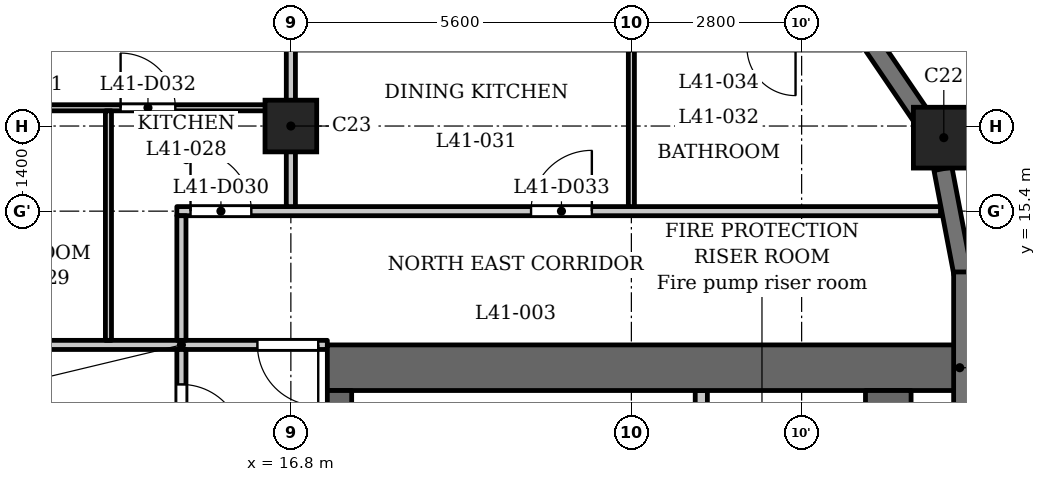
"""IFC4 building model, lengths in metres.
Left out: names, types, materials, properties, quantities, classifications, styles, units other than length and angle.
Written with IfcOpenShell. Run it as: python <this file> out.ifc"""

import sys

from ifc_helpers import new_model, si_unit, direction, frame, frame_2d, origin, origin_2d, place, context, subcontext, project, spatial, rectangle, extrude, element, fill, save


model = new_model("IFC4")
c1 = context("Model", 3, precision=1e-05, world=origin(), true_north=direction((0.0, 1.0)))
c2 = subcontext(c1, "Body", "Model", "MODEL_VIEW")
j1 = project(units=[si_unit("LENGTHUNIT", "METRE"), si_unit("PLANEANGLEUNIT", "RADIAN")], contexts=[c1])
p1 = place(None, origin())
s1 = spatial("IfcSite", under=j1, at=p1, CompositionType="ELEMENT")
p2 = place(p1, origin())
s2 = spatial("IfcBuilding", under=s1, at=p2, CompositionType="ELEMENT")
p3 = place(p2, frame((0.0, 0.0, 160.6)))
s3 = spatial("IfcBuildingStorey", under=s2, at=p3, CompositionType="ELEMENT", Elevation=160.6)
p4 = place(p3, frame((27.538, 16.609, 0.0), z_axis=(0.0, 0.0, 1.0), x_axis=(1.0, 0.0, 0.0)))
e1 = element("IfcColumn", 1, at=p4, inside=s3, PredefinedType="COLUMN", context=c2, shape_type="SweptSolid", body=[
    extrude(rectangle(XDim=1.0, YDim=1.0, at=origin_2d()), origin(), (0.0, 0.0, 1.0), 3.5),
])
p5 = place(p3, frame((16.8, 16.8, 0.0), z_axis=(0.0, 0.0, 1.0), x_axis=(1.0, 0.0, 0.0)))
e2 = element("IfcColumn", 2, at=p5, inside=s3, PredefinedType="COLUMN", context=c2, shape_type="SweptSolid", body=[
    extrude(rectangle(XDim=0.85, YDim=0.85, at=origin_2d()), origin(), (0.0, 0.0, 1.0), 3.5),
])
p6 = place(p3, frame((27.85, 11.7, 0.0), z_axis=(0.0, 0.0, 1.0), x_axis=(0.0, 1.0, 0.0)))
e3 = element("IfcWall", 3, at=p6, inside=s3, PredefinedType="SOLIDWALL", context=c2, shape_type="SweptSolid", body=[
    extrude(rectangle(XDim=2.7, YDim=0.3, at=frame_2d((1.35, 0.0))), origin(), (0.0, 0.0, 1.0), 2.45),
])
for number, where, z_axis, x_axis in (
    (4, (27.853, 14.372, 0.0), (0.0, 0.0, 1.0), (-0.187, 0.982, 0.0)),
    (5, (27.166, 16.96, 0.0), (0.0, 0.0, 1.0), (-0.562, 0.827, 0.0)),
):
    element("IfcWall", number, at=place(p3, frame(where, z_axis=z_axis, x_axis=x_axis)), inside=s3, PredefinedType="SOLIDWALL", context=c2, shape_type="SweptSolid", body=[
        extrude(rectangle(XDim=1.756, YDim=0.3, at=frame_2d((0.878, 0.0))), origin(), (0.0, 0.0, 1.0), 2.45),
    ])
p7 = place(p3, frame((17.4, 12.825, 0.0), z_axis=(0.0, 0.0, 1.0), x_axis=(1.0, 0.0, 0.0)))
e6 = element("IfcWall", 6, at=p7, inside=s3, PredefinedType="SHEAR", context=c2, shape_type="SweptSolid", body=[
    extrude(rectangle(XDim=10.4, YDim=0.75, at=frame_2d((5.2, 0.0))), origin(), (0.0, 0.0, 1.0), 3.2),
])
p8 = place(p3, frame((17.6, -12.45, 0.0), z_axis=(0.0, 0.0, 1.0), x_axis=(0.0, 1.0, 0.0)))
e7 = element("IfcWall", 7, at=p8, inside=s3, PredefinedType="SHEAR", context=c2, shape_type="SweptSolid", body=[
    extrude(rectangle(XDim=24.9, YDim=0.4, at=frame_2d((12.45, 0.0))), origin(), (0.0, 0.0, 1.0), 3.2),
])
p9 = place(p8, frame((8.65, 0.0, 0.0)))
e8 = element("IfcOpeningElement", 8, at=p9, cuts=e7, PredefinedType="OPENING", context=c2, shape_type="SweptSolid", body=[
    extrude(rectangle(XDim=0.9, YDim=2.1, at=frame_2d((0.45, 1.05))), frame((0.0, 0.21, 0.0), z_axis=(0.0, -1.0, 0.0), x_axis=(1.0, 0.0, 0.0)), (0.0, 0.0, 1.0), 0.42),
])
p10 = place(p8, frame((15.6, 0.0, 0.0)))
e9 = element("IfcOpeningElement", 9, at=p10, cuts=e7, PredefinedType="OPENING", context=c2, shape_type="SweptSolid", body=[
    extrude(rectangle(XDim=1.1, YDim=2.1, at=frame_2d((0.55, 1.05))), frame((0.0, 0.21, 0.0), z_axis=(0.0, -1.0, 0.0), x_axis=(1.0, 0.0, 0.0)), (0.0, 0.0, 1.0), 0.42),
])
p11 = place(p8, frame((18.0, 0.0, 0.0)))
e10 = element("IfcOpeningElement", 10, at=p11, cuts=e7, PredefinedType="OPENING", context=c2, shape_type="SweptSolid", body=[
    extrude(rectangle(XDim=1.1, YDim=2.1, at=frame_2d((0.55, 1.05))), frame((0.0, 0.21, 0.0), z_axis=(0.0, -1.0, 0.0), x_axis=(1.0, 0.0, 0.0)), (0.0, 0.0, 1.0), 0.42),
])
p12 = place(p8, frame((23.025, 0.0, 0.0)))
e11 = element("IfcOpeningElement", 11, at=p12, cuts=e7, PredefinedType="OPENING", context=c2, shape_type="SweptSolid", body=[
    extrude(rectangle(XDim=1.1, YDim=2.1, at=frame_2d((0.55, 1.05))), frame((0.0, 0.21, 0.0), z_axis=(0.0, -1.0, 0.0), x_axis=(1.0, 0.0, 0.0)), (0.0, 0.0, 1.0), 0.42),
])
p13 = place(p8, frame((0.775, 0.0, 0.0)))
e12 = element("IfcOpeningElement", 12, at=p13, cuts=e7, PredefinedType="OPENING", context=c2, shape_type="SweptSolid", body=[
    extrude(rectangle(XDim=1.1, YDim=2.1, at=frame_2d((0.55, 1.05))), frame((0.0, 0.21, 0.0), z_axis=(0.0, -1.0, 0.0), x_axis=(1.0, 0.0, 0.0)), (0.0, 0.0, 1.0), 0.42),
])
p14 = place(p8, frame((12.925, 0.0, 0.0)))
e13 = element("IfcOpeningElement", 13, at=p14, cuts=e7, PredefinedType="OPENING", context=c2, shape_type="SweptSolid", body=[
    extrude(rectangle(XDim=1.8, YDim=2.1, at=frame_2d((0.9, 1.05))), frame((0.0, 0.21, 0.0), z_axis=(0.0, -1.0, 0.0), x_axis=(1.0, 0.0, 0.0)), (0.0, 0.0, 1.0), 0.42),
])
p15 = place(p3, frame((26.625, -12.45, 0.0), z_axis=(0.0, 0.0, 1.0), x_axis=(0.0, 1.0, 0.0)))
e14 = element("IfcWall", 14, at=p15, inside=s3, PredefinedType="SHEAR", context=c2, shape_type="SweptSolid", body=[
    extrude(rectangle(XDim=24.9, YDim=0.75, at=frame_2d((12.45, 0.0))), origin(), (0.0, 0.0, 1.0), 3.2),
])
p16 = place(p3, frame((23.55, 9.8, 0.0), z_axis=(0.0, 0.0, 1.0), x_axis=(0.0, 1.0, 0.0)))
e15 = element("IfcWall", 15, at=p16, inside=s3, PredefinedType="PARTITIONING", context=c2, shape_type="SweptSolid", body=[
    extrude(rectangle(XDim=2.65, YDim=0.2, at=frame_2d((1.325, 0.0))), origin(), (0.0, 0.0, 1.0), 3.2),
])
p17 = place(p16, frame((0.875, 0.0, 0.0)))
e16 = element("IfcOpeningElement", 16, at=p17, cuts=e15, PredefinedType="OPENING", context=c2, shape_type="SweptSolid", body=[
    extrude(rectangle(XDim=0.9, YDim=2.1, at=frame_2d((0.45, 1.05))), frame((0.0, 0.11, 0.0), z_axis=(0.0, -1.0, 0.0), x_axis=(1.0, 0.0, 0.0)), (0.0, 0.0, 1.0), 0.22),
])
p18 = place(p3, frame((-17.4, 13.2, 0.0), z_axis=(0.0, 0.0, 1.0), x_axis=(1.0, 0.0, 0.0)))
e17 = element("IfcWall", 17, at=p18, inside=s3, PredefinedType="PARTITIONING", context=c2, shape_type="SweptSolid", body=[
    extrude(rectangle(XDim=34.8, YDim=0.15, at=frame_2d((17.4, 0.0))), origin(), (0.0, 0.0, 1.0), 3.2),
])
p19 = place(p18, frame((0.25, 0.0, 0.0)))
e18 = element("IfcOpeningElement", 18, at=p19, cuts=e17, PredefinedType="OPENING", context=c2, shape_type="SweptSolid", body=[
    extrude(rectangle(XDim=1.0, YDim=2.1, at=frame_2d((0.5, 1.05))), frame((0.0, 0.085, 0.0), z_axis=(0.0, -1.0, 0.0), x_axis=(1.0, 0.0, 0.0)), (0.0, 0.0, 1.0), 0.17),
])
p20 = place(p18, frame((33.65, 0.0, 0.0)))
e19 = element("IfcOpeningElement", 19, at=p20, cuts=e17, PredefinedType="OPENING", context=c2, shape_type="SweptSolid", body=[
    extrude(rectangle(XDim=1.0, YDim=2.1, at=frame_2d((0.5, 1.05))), frame((0.0, 0.085, 0.0), z_axis=(0.0, -1.0, 0.0), x_axis=(1.0, 0.0, 0.0)), (0.0, 0.0, 1.0), 0.17),
])
p21 = place(p18, frame((15.75, 0.0, 0.0)))
e20 = element("IfcOpeningElement", 20, at=p21, cuts=e17, PredefinedType="OPENING", context=c2, shape_type="SweptSolid", body=[
    extrude(rectangle(XDim=1.0, YDim=2.1, at=frame_2d((0.5, 1.05))), frame((0.0, 0.085, 0.0), z_axis=(0.0, -1.0, 0.0), x_axis=(1.0, 0.0, 0.0)), (0.0, 0.0, 1.0), 0.17),
])
p22 = place(p18, frame((20.85, 0.0, 0.0)))
e21 = element("IfcOpeningElement", 21, at=p22, cuts=e17, PredefinedType="OPENING", context=c2, shape_type="SweptSolid", body=[
    extrude(rectangle(XDim=1.0, YDim=2.1, at=frame_2d((0.5, 1.05))), frame((0.0, 0.085, 0.0), z_axis=(0.0, -1.0, 0.0), x_axis=(1.0, 0.0, 0.0)), (0.0, 0.0, 1.0), 0.17),
])
p23 = place(p18, frame((23.55, 0.0, 0.0)))
e22 = element("IfcOpeningElement", 22, at=p23, cuts=e17, PredefinedType="OPENING", context=c2, shape_type="SweptSolid", body=[
    extrude(rectangle(XDim=1.0, YDim=2.1, at=frame_2d((0.5, 1.05))), frame((0.0, 0.085, 0.0), z_axis=(0.0, -1.0, 0.0), x_axis=(1.0, 0.0, 0.0)), (0.0, 0.0, 1.0), 0.17),
])
p24 = place(p3, frame((14.925, 15.4, 0.0), z_axis=(0.0, 0.0, 1.0), x_axis=(1.0, 0.0, 0.0)))
e23 = element("IfcWall", 23, at=p24, inside=s3, PredefinedType="PARTITIONING", context=c2, shape_type="SweptSolid", body=[
    extrude(rectangle(XDim=12.559, YDim=0.15, at=frame_2d((6.279, 0.0))), origin(), (0.0, 0.0, 1.0), 3.2),
])
p25 = place(p24, frame((0.225, 0.0, 0.0)))
e24 = element("IfcOpeningElement", 24, at=p25, cuts=e23, PredefinedType="OPENING", context=c2, shape_type="SweptSolid", body=[
    extrude(rectangle(XDim=1.0, YDim=2.1, at=frame_2d((0.5, 1.05))), frame((0.0, 0.085, 0.0), z_axis=(0.0, -1.0, 0.0), x_axis=(1.0, 0.0, 0.0)), (0.0, 0.0, 1.0), 0.17),
])
p26 = place(p24, frame((5.825, 0.0, 0.0)))
e25 = element("IfcOpeningElement", 25, at=p26, cuts=e23, PredefinedType="OPENING", context=c2, shape_type="SweptSolid", body=[
    extrude(rectangle(XDim=1.0, YDim=2.1, at=frame_2d((0.5, 1.05))), frame((0.0, 0.085, 0.0), z_axis=(0.0, -1.0, 0.0), x_axis=(1.0, 0.0, 0.0)), (0.0, 0.0, 1.0), 0.17),
])
p27 = place(p3, frame((-16.725, 17.1, 0.0), z_axis=(0.0, 0.0, 1.0), x_axis=(1.0, 0.0, 0.0)))
e26 = element("IfcWall", 26, at=p27, inside=s3, PredefinedType="PARTITIONING", context=c2, shape_type="SweptSolid", body=[
    extrude(rectangle(XDim=33.45, YDim=0.1, at=frame_2d((16.725, 0.0))), origin(), (0.0, 0.0, 1.0), 3.2),
])
p28 = place(p27, frame((11.925, 0.0, 0.0)))
e27 = element("IfcOpeningElement", 27, at=p28, cuts=e26, PredefinedType="OPENING", context=c2, shape_type="SweptSolid", body=[
    extrude(rectangle(XDim=0.9, YDim=2.1, at=frame_2d((0.45, 1.05))), frame((0.0, 0.06, 0.0), z_axis=(0.0, -1.0, 0.0), x_axis=(1.0, 0.0, 0.0)), (0.0, 0.0, 1.0), 0.12),
])
p29 = place(p27, frame((15.175, 0.0, 0.0)))
e28 = element("IfcOpeningElement", 28, at=p29, cuts=e26, PredefinedType="OPENING", context=c2, shape_type="SweptSolid", body=[
    extrude(rectangle(XDim=0.9, YDim=2.1, at=frame_2d((0.45, 1.05))), frame((0.0, 0.06, 0.0), z_axis=(0.0, -1.0, 0.0), x_axis=(1.0, 0.0, 0.0)), (0.0, 0.0, 1.0), 0.12),
])
p30 = place(p27, frame((6.575, 0.0, 0.0)))
e29 = element("IfcOpeningElement", 29, at=p30, cuts=e26, PredefinedType="OPENING", context=c2, shape_type="SweptSolid", body=[
    extrude(rectangle(XDim=0.9, YDim=2.1, at=frame_2d((0.45, 1.05))), frame((0.0, 0.06, 0.0), z_axis=(0.0, -1.0, 0.0), x_axis=(1.0, 0.0, 0.0)), (0.0, 0.0, 1.0), 0.12),
])
p31 = place(p27, frame((17.375, 0.0, 0.0)))
e30 = element("IfcOpeningElement", 30, at=p31, cuts=e26, PredefinedType="OPENING", context=c2, shape_type="SweptSolid", body=[
    extrude(rectangle(XDim=0.8, YDim=2.1, at=frame_2d((0.4, 1.05))), frame((0.0, 0.06, 0.0), z_axis=(0.0, -1.0, 0.0), x_axis=(1.0, 0.0, 0.0)), (0.0, 0.0, 1.0), 0.12),
])
p32 = place(p27, frame((20.025, 0.0, 0.0)))
e31 = element("IfcOpeningElement", 31, at=p32, cuts=e26, PredefinedType="OPENING", context=c2, shape_type="SweptSolid", body=[
    extrude(rectangle(XDim=0.9, YDim=2.1, at=frame_2d((0.45, 1.05))), frame((0.0, 0.06, 0.0), z_axis=(0.0, -1.0, 0.0), x_axis=(1.0, 0.0, 0.0)), (0.0, 0.0, 1.0), 0.12),
])
p33 = place(p27, frame((26.425, 0.0, 0.0)))
e32 = element("IfcOpeningElement", 32, at=p33, cuts=e26, PredefinedType="OPENING", context=c2, shape_type="SweptSolid", body=[
    extrude(rectangle(XDim=0.8, YDim=2.1, at=frame_2d((0.4, 1.05))), frame((0.0, 0.06, 0.0), z_axis=(0.0, -1.0, 0.0), x_axis=(1.0, 0.0, 0.0)), (0.0, 0.0, 1.0), 0.12),
])
p34 = place(p27, frame((23.025, 0.0, 0.0)))
e33 = element("IfcOpeningElement", 33, at=p34, cuts=e26, PredefinedType="OPENING", context=c2, shape_type="SweptSolid", body=[
    extrude(rectangle(XDim=0.9, YDim=2.1, at=frame_2d((0.45, 1.05))), frame((0.0, 0.06, 0.0), z_axis=(0.0, -1.0, 0.0), x_axis=(1.0, 0.0, 0.0)), (0.0, 0.0, 1.0), 0.12),
])
p35 = place(p27, frame((28.575, 0.0, 0.0)))
e34 = element("IfcOpeningElement", 34, at=p35, cuts=e26, PredefinedType="OPENING", context=c2, shape_type="SweptSolid", body=[
    extrude(rectangle(XDim=0.8, YDim=2.1, at=frame_2d((0.4, 1.05))), frame((0.0, 0.06, 0.0), z_axis=(0.0, -1.0, 0.0), x_axis=(1.0, 0.0, 0.0)), (0.0, 0.0, 1.0), 0.12),
])
p36 = place(p27, frame((30.725, 0.0, 0.0)))
e35 = element("IfcOpeningElement", 35, at=p36, cuts=e26, PredefinedType="OPENING", context=c2, shape_type="SweptSolid", body=[
    extrude(rectangle(XDim=0.9, YDim=2.1, at=frame_2d((0.45, 1.05))), frame((0.0, 0.06, 0.0), z_axis=(0.0, -1.0, 0.0), x_axis=(1.0, 0.0, 0.0)), (0.0, 0.0, 1.0), 0.12),
])
p37 = place(p3, frame((13.8, 13.275, 0.0), z_axis=(0.0, 0.0, 1.0), x_axis=(0.0, 1.0, 0.0)))
e36 = element("IfcWall", 36, at=p37, inside=s3, PredefinedType="PARTITIONING", context=c2, shape_type="SweptSolid", body=[
    extrude(rectangle(XDim=3.775, YDim=0.1, at=frame_2d((1.888, 0.0))), origin(), (0.0, 0.0, 1.0), 3.2),
])
p38 = place(p3, frame((15.0, 6.769, 0.0), z_axis=(0.0, 0.0, 1.0), x_axis=(0.0, 1.0, 0.0)))
e37 = element("IfcWall", 37, at=p38, inside=s3, PredefinedType="PARTITIONING", context=c2, shape_type="SweptSolid", body=[
    extrude(rectangle(XDim=6.356, YDim=0.15, at=frame_2d((3.178, 0.0))), origin(), (0.0, 0.0, 1.0), 3.2),
])
p39 = place(p38, frame((4.781, 0.0, 0.0)))
e38 = element("IfcOpeningElement", 38, at=p39, cuts=e37, PredefinedType="OPENING", context=c2, shape_type="SweptSolid", body=[
    extrude(rectangle(XDim=1.0, YDim=2.1, at=frame_2d((0.5, 1.05))), frame((0.0, 0.085, 0.0), z_axis=(0.0, -1.0, 0.0), x_axis=(1.0, 0.0, 0.0)), (0.0, 0.0, 1.0), 0.17),
])
p40 = place(p3, frame((15.0, 13.275, 0.0), z_axis=(0.0, 0.0, 1.0), x_axis=(0.0, 1.0, 0.0)))
e39 = element("IfcWall", 39, at=p40, inside=s3, PredefinedType="PARTITIONING", context=c2, shape_type="SweptSolid", body=[
    extrude(rectangle(XDim=2.05, YDim=0.15, at=frame_2d((1.025, 0.0))), origin(), (0.0, 0.0, 1.0), 3.2),
])
p41 = place(p3, frame((16.8, 15.475, 0.0), z_axis=(0.0, 0.0, 1.0), x_axis=(0.0, 1.0, 0.0)))
e40 = element("IfcWall", 40, at=p41, inside=s3, PredefinedType="PARTITIONING", context=c2, shape_type="SweptSolid", body=[
    extrude(rectangle(XDim=7.405, YDim=0.15, at=frame_2d((3.702, 0.0))), origin(), (0.0, 0.0, 1.0), 3.2),
])
p42 = place(p3, frame((22.4, 15.475, 0.0), z_axis=(0.0, 0.0, 1.0), x_axis=(0.0, 1.0, 0.0)))
e41 = element("IfcWall", 41, at=p42, inside=s3, PredefinedType="PARTITIONING", context=c2, shape_type="SweptSolid", body=[
    extrude(rectangle(XDim=2.575, YDim=0.1, at=frame_2d((1.288, 0.0))), origin(), (0.0, 0.0, 1.0), 3.2),
])
p43 = place(p39, origin())
e42 = element("IfcDoor", 42, at=p43, inside=s3, OperationType="SINGLE_SWING_LEFT", PredefinedType="DOOR", context=c2, shape_type="SweptSolid", body=[
    extrude(rectangle(XDim=1.0, YDim=2.1, at=frame_2d((0.5, 1.05))), frame((0.0, 0.025, 0.0), z_axis=(0.0, -1.0, 0.0), x_axis=(1.0, 0.0, 0.0)), (0.0, 0.0, 1.0), 0.05),
])
fill(e38, e42)
p44 = place(p20, origin())
e43 = element("IfcDoor", 43, at=p44, inside=s3, OperationType="SINGLE_SWING_RIGHT", PredefinedType="DOOR", context=c2, shape_type="SweptSolid", body=[
    extrude(rectangle(XDim=1.0, YDim=2.1, at=frame_2d((0.5, 1.05))), frame((0.0, 0.025, 0.0), z_axis=(0.0, -1.0, 0.0), x_axis=(1.0, 0.0, 0.0)), (0.0, 0.0, 1.0), 0.05),
])
fill(e19, e43)
p45 = place(p25, origin())
e44 = element("IfcDoor", 44, at=p45, inside=s3, OperationType="SINGLE_SWING_RIGHT", PredefinedType="DOOR", context=c2, shape_type="SweptSolid", body=[
    extrude(rectangle(XDim=1.0, YDim=2.1, at=frame_2d((0.5, 1.05))), frame((0.0, 0.025, 0.0), z_axis=(0.0, -1.0, 0.0), x_axis=(1.0, 0.0, 0.0)), (0.0, 0.0, 1.0), 0.05),
])
fill(e24, e44)
p46 = place(p36, origin())
e45 = element("IfcDoor", 45, at=p46, inside=s3, OperationType="SINGLE_SWING_RIGHT", PredefinedType="DOOR", context=c2, shape_type="SweptSolid", body=[
    extrude(rectangle(XDim=0.9, YDim=2.1, at=frame_2d((0.45, 1.05))), frame((0.0, 0.025, 0.0), z_axis=(0.0, -1.0, 0.0), x_axis=(1.0, 0.0, 0.0)), (0.0, 0.0, 1.0), 0.05),
])
fill(e35, e45)
p47 = place(p26, origin())
e46 = element("IfcDoor", 46, at=p47, inside=s3, OperationType="SINGLE_SWING_LEFT", PredefinedType="DOOR", context=c2, shape_type="SweptSolid", body=[
    extrude(rectangle(XDim=1.0, YDim=2.1, at=frame_2d((0.5, 1.05))), frame((0.0, 0.025, 0.0), z_axis=(0.0, -1.0, 0.0), x_axis=(1.0, 0.0, 0.0)), (0.0, 0.0, 1.0), 0.05),
])
fill(e25, e46)
save(model, sys.argv[1])
